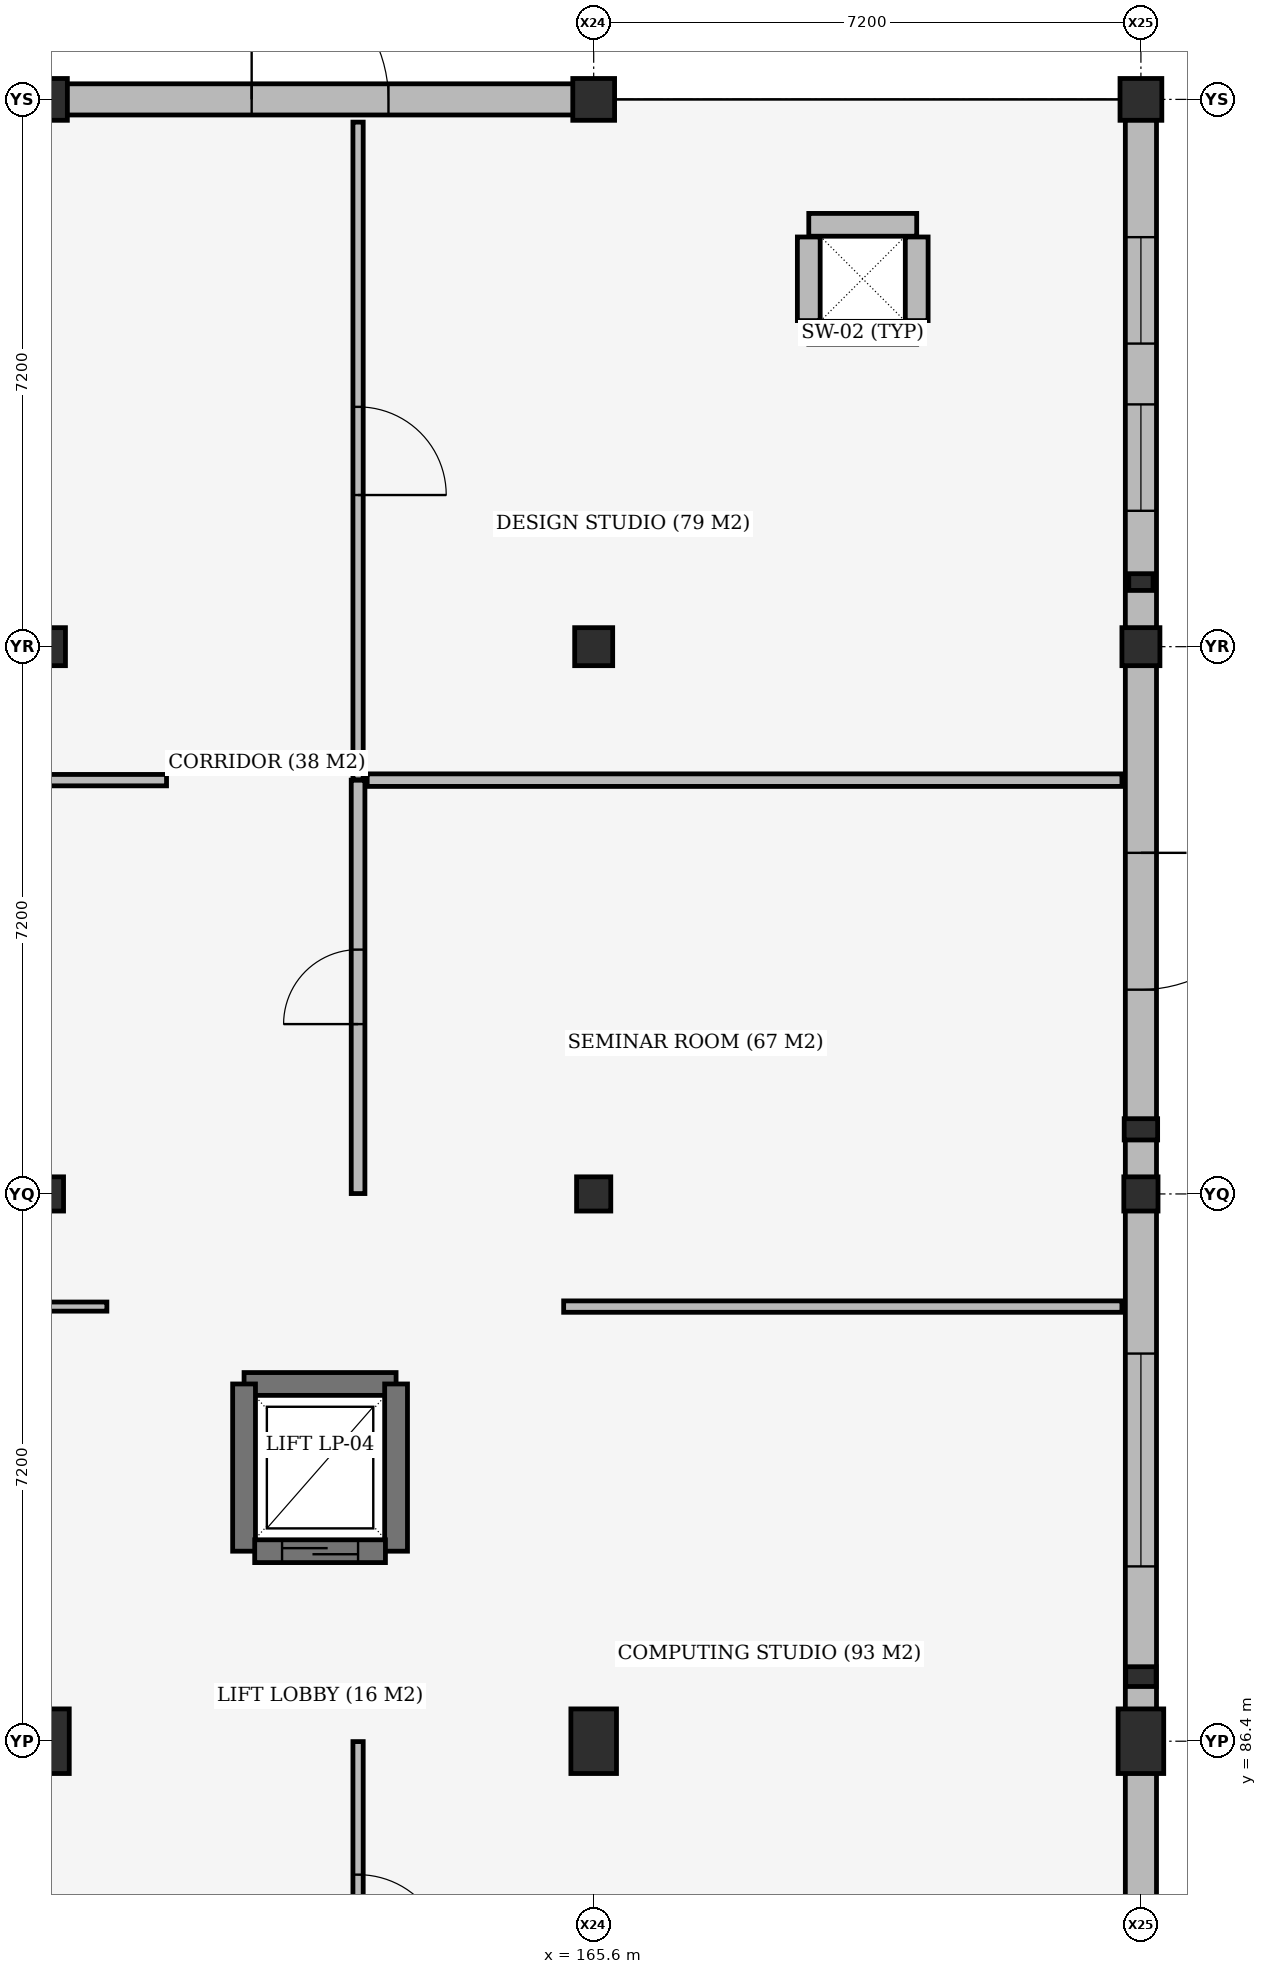
"""IFC4 building model, lengths in metres.
Left out: names, types, materials, properties, quantities, classifications, styles, units other than length and angle.
Written with IfcOpenShell. Run it as: python <this file> out.ifc"""

import sys

from ifc_helpers import new_model, si_unit, direction, frame, frame_2d, origin, origin_2d, place, context, subcontext, project, spatial, rectangle, extrude, element, fill, save


model = new_model("IFC4")
c1 = context("Model", 3, precision=1e-05, world=origin(), true_north=direction((0.0, 1.0)))
c2 = subcontext(c1, "Body", "Model", "MODEL_VIEW")
j1 = project(units=[si_unit("LENGTHUNIT", "METRE"), si_unit("PLANEANGLEUNIT", "RADIAN")], contexts=[c1])
p1 = place(None, origin())
s1 = spatial("IfcSite", under=j1, at=p1, CompositionType="ELEMENT")
p2 = place(p1, origin())
s2 = spatial("IfcBuilding", under=s1, at=p2, CompositionType="ELEMENT")
p3 = place(p2, origin())
s3 = spatial("IfcBuildingStorey", under=s2, at=p3, CompositionType="ELEMENT", Elevation=0.0)
p4 = place(p3, frame((168.43, 104.93, 0.0), z_axis=(0.0, 0.0, 1.0), x_axis=(1.0, 0.0, 0.0)))
e1 = element("IfcWall", 1, at=p4, inside=s3, PredefinedType="SHEAR", context=c2, shape_type="SweptSolid", body=[
    extrude(rectangle(XDim=1.42, YDim=0.3, at=frame_2d((0.71, 0.0))), origin(), (0.0, 0.0, 1.0), 5.16),
])
p5 = place(p3, frame((169.85, 105.09, 0.0), z_axis=(0.0, 0.0, 1.0), x_axis=(0.0, 1.0, 0.0)))
e2 = element("IfcWall", 2, at=p5, inside=s3, PredefinedType="SHEAR", context=c2, shape_type="SweptSolid", body=[
    extrude(rectangle(XDim=1.1, YDim=0.3, at=frame_2d((0.55, 0.0))), origin(), (0.0, 0.0, 1.0), 5.16),
])
p6 = place(p3, frame((169.85, 106.35, 0.0), z_axis=(0.0, 0.0, 1.0), x_axis=(-1.0, 0.0, 0.0)))
e3 = element("IfcWall", 3, at=p6, inside=s3, PredefinedType="SHEAR", context=c2, shape_type="SweptSolid", body=[
    extrude(rectangle(XDim=1.42, YDim=0.3, at=frame_2d((0.71, 0.0))), origin(), (0.0, 0.0, 1.0), 5.16),
])
p7 = place(p3, frame((168.43, 106.19, 0.0), z_axis=(0.0, 0.0, 1.0), x_axis=(0.0, -1.0, 0.0)))
e4 = element("IfcWall", 4, at=p7, inside=s3, PredefinedType="SHEAR", context=c2, shape_type="SweptSolid", body=[
    extrude(rectangle(XDim=1.1, YDim=0.3, at=frame_2d((0.55, 0.0))), origin(), (0.0, 0.0, 1.0), 5.16),
])
p8 = place(p3, frame((158.4, 86.4, 0.0), z_axis=(0.0, 0.0, 1.0), x_axis=(1.0, 0.0, 0.0)))
e5 = element("IfcColumn", 5, at=p8, inside=s3, PredefinedType="COLUMN", context=c2, shape_type="SweptSolid", body=[
    extrude(rectangle(XDim=0.6, YDim=0.85, at=origin_2d()), origin(), (0.0, 0.0, 1.0), 5.1),
])
p9 = place(p3, frame((158.4, 93.6, 0.0), z_axis=(0.0, 0.0, 1.0), x_axis=(1.0, 0.0, 0.0)))
e6 = element("IfcColumn", 6, at=p9, inside=s3, PredefinedType="COLUMN", context=c2, shape_type="SweptSolid", body=[
    extrude(rectangle(XDim=0.45, YDim=0.45, at=origin_2d()), origin(), (0.0, 0.0, 1.0), 5.1),
])
p10 = place(p3, frame((158.4, 100.8, 0.0), z_axis=(0.0, 0.0, 1.0), x_axis=(1.0, 0.0, 0.0)))
e7 = element("IfcColumn", 7, at=p10, inside=s3, PredefinedType="COLUMN", context=c2, shape_type="SweptSolid", body=[
    extrude(rectangle(XDim=0.5, YDim=0.5, at=origin_2d()), origin(), (0.0, 0.0, 1.0), 5.1),
])
p11 = place(p3, frame((158.4, 108.0, 0.0), z_axis=(0.0, 0.0, 1.0), x_axis=(1.0, 0.0, 0.0)))
e8 = element("IfcColumn", 8, at=p11, inside=s3, PredefinedType="COLUMN", context=c2, shape_type="SweptSolid", body=[
    extrude(rectangle(XDim=0.55, YDim=0.55, at=origin_2d()), origin(), (0.0, 0.0, 1.0), 5.1),
])
p12 = place(p3, frame((165.6, 86.4, 0.0), z_axis=(0.0, 0.0, 1.0), x_axis=(1.0, 0.0, 0.0)))
e9 = element("IfcColumn", 9, at=p12, inside=s3, PredefinedType="COLUMN", context=c2, shape_type="SweptSolid", body=[
    extrude(rectangle(XDim=0.6, YDim=0.85, at=origin_2d()), origin(), (0.0, 0.0, 1.0), 5.1),
])
p13 = place(p3, frame((165.6, 93.6, 0.0), z_axis=(0.0, 0.0, 1.0), x_axis=(1.0, 0.0, 0.0)))
e10 = element("IfcColumn", 10, at=p13, inside=s3, PredefinedType="COLUMN", context=c2, shape_type="SweptSolid", body=[
    extrude(rectangle(XDim=0.45, YDim=0.45, at=origin_2d()), origin(), (0.0, 0.0, 1.0), 5.1),
])
p14 = place(p3, frame((165.6, 100.8, 0.0), z_axis=(0.0, 0.0, 1.0), x_axis=(1.0, 0.0, 0.0)))
e11 = element("IfcColumn", 11, at=p14, inside=s3, PredefinedType="COLUMN", context=c2, shape_type="SweptSolid", body=[
    extrude(rectangle(XDim=0.5, YDim=0.5, at=origin_2d()), origin(), (0.0, 0.0, 1.0), 5.1),
])
p15 = place(p3, frame((165.6, 108.0, 0.0), z_axis=(0.0, 0.0, 1.0), x_axis=(1.0, 0.0, 0.0)))
e12 = element("IfcColumn", 12, at=p15, inside=s3, PredefinedType="COLUMN", context=c2, shape_type="SweptSolid", body=[
    extrude(rectangle(XDim=0.55, YDim=0.55, at=origin_2d()), origin(), (0.0, 0.0, 1.0), 5.1),
])
p16 = place(p3, frame((172.8, 86.4, 0.0), z_axis=(0.0, 0.0, 1.0), x_axis=(1.0, 0.0, 0.0)))
e13 = element("IfcColumn", 13, at=p16, inside=s3, PredefinedType="COLUMN", context=c2, shape_type="SweptSolid", body=[
    extrude(rectangle(XDim=0.6, YDim=0.85, at=origin_2d()), origin(), (0.0, 0.0, 1.0), 5.1),
])
p17 = place(p3, frame((172.8, 93.6, 0.0), z_axis=(0.0, 0.0, 1.0), x_axis=(1.0, 0.0, 0.0)))
e14 = element("IfcColumn", 14, at=p17, inside=s3, PredefinedType="COLUMN", context=c2, shape_type="SweptSolid", body=[
    extrude(rectangle(XDim=0.45, YDim=0.45, at=origin_2d()), origin(), (0.0, 0.0, 1.0), 5.1),
])
p18 = place(p3, frame((172.8, 100.8, 0.0), z_axis=(0.0, 0.0, 1.0), x_axis=(1.0, 0.0, 0.0)))
e15 = element("IfcColumn", 15, at=p18, inside=s3, PredefinedType="COLUMN", context=c2, shape_type="SweptSolid", body=[
    extrude(rectangle(XDim=0.5, YDim=0.5, at=origin_2d()), origin(), (0.0, 0.0, 1.0), 5.1),
])
p19 = place(p3, frame((172.8, 108.0, 0.0), z_axis=(0.0, 0.0, 1.0), x_axis=(1.0, 0.0, 0.0)))
e16 = element("IfcColumn", 16, at=p19, inside=s3, PredefinedType="COLUMN", context=c2, shape_type="SweptSolid", body=[
    extrude(rectangle(XDim=0.55, YDim=0.55, at=origin_2d()), origin(), (0.0, 0.0, 1.0), 5.1),
])
p20 = place(p3, frame((172.8, 87.25, 0.0), z_axis=(0.0, 0.0, 1.0), x_axis=(1.0, 0.0, 0.0)))
e17 = element("IfcColumn", 17, at=p20, inside=s3, PredefinedType="PILASTER", context=c2, shape_type="SweptSolid", body=[
    extrude(rectangle(XDim=0.4, YDim=0.26, at=origin_2d()), origin(), (0.0, 0.0, 1.0), 5.1),
])
p21 = place(p3, frame((172.8, 94.45, 0.0), z_axis=(0.0, 0.0, 1.0), x_axis=(1.0, 0.0, 0.0)))
e18 = element("IfcColumn", 18, at=p21, inside=s3, PredefinedType="PILASTER", context=c2, shape_type="SweptSolid", body=[
    extrude(rectangle(XDim=0.44, YDim=0.28, at=origin_2d()), origin(), (0.0, 0.0, 1.0), 5.1),
])
p22 = place(p3, frame((172.8, 101.65, 0.0), z_axis=(0.0, 0.0, 1.0), x_axis=(1.0, 0.0, 0.0)))
e19 = element("IfcColumn", 19, at=p22, inside=s3, PredefinedType="PILASTER", context=c2, shape_type="SweptSolid", body=[
    extrude(rectangle(XDim=0.32, YDim=0.22, at=origin_2d()), origin(), (0.0, 0.0, 1.0), 5.1),
])
p23 = place(p3, frame((163.0, 91.1, 0.0), z_axis=(0.0, 0.0, 1.0), x_axis=(-1.0, 0.0, 0.0)))
e20 = element("IfcWall", 20, at=p23, inside=s3, PredefinedType="SHEAR", context=c2, shape_type="SweptSolid", body=[
    extrude(rectangle(XDim=2.0, YDim=0.3, at=frame_2d((1.0, 0.0))), origin(), (0.0, 0.0, 1.0), 5.1),
])
for number, where, z_axis, x_axis in (
    (21, (161.0, 91.1, 0.0), (0.0, 0.0, 1.0), (0.0, -1.0, 0.0)),
    (22, (163.0, 88.9, 0.0), (0.0, 0.0, 1.0), (0.0, 1.0, 0.0)),
):
    element("IfcWall", number, at=place(p3, frame(where, z_axis=z_axis, x_axis=x_axis)), inside=s3, PredefinedType="SHEAR", context=c2, shape_type="SweptSolid", body=[
        extrude(rectangle(XDim=2.2, YDim=0.3, at=frame_2d((1.1, 0.0))), origin(), (0.0, 0.0, 1.0), 5.1),
    ])
p24 = place(p3, frame((158.667, 108.0, 0.0), z_axis=(0.0, 0.0, 1.0), x_axis=(1.0, 0.0, 0.0)))
e23 = element("IfcWall", 23, at=p24, inside=s3, PredefinedType="STANDARD", context=c2, shape_type="SweptSolid", body=[
    extrude(rectangle(XDim=6.666, YDim=0.41, at=frame_2d((3.333, 0.0))), origin(), (0.0, 0.0, 1.0), 4.5),
])
p25 = place(p24, frame((2.433, 0.0, 0.0)))
e24 = element("IfcOpeningElement", 24, at=p25, cuts=e23, PredefinedType="OPENING", context=c2, shape_type="SweptSolid", body=[
    extrude(rectangle(XDim=1.8, YDim=2.2, at=frame_2d((0.9, 1.1))), frame((0.0, 0.215, 0.0), z_axis=(0.0, -1.0, 0.0), x_axis=(1.0, 0.0, 0.0)), (0.0, 0.0, 1.0), 0.43),
])
p26 = place(p3, frame((172.8, 85.983, 0.0), z_axis=(0.0, 0.0, 1.0), x_axis=(0.0, -1.0, 0.0)))
e25 = element("IfcWall", 25, at=p26, inside=s3, PredefinedType="STANDARD", context=c2, shape_type="SweptSolid", body=[
    extrude(rectangle(XDim=2.841, YDim=0.41, at=frame_2d((1.42, 0.0))), origin(), (0.0, 0.0, 1.0), 4.5),
])
p27 = place(p3, frame((172.8, 93.383, 0.0), z_axis=(0.0, 0.0, 1.0), x_axis=(0.0, -1.0, 0.0)))
e26 = element("IfcWall", 26, at=p27, inside=s3, PredefinedType="STANDARD", context=c2, shape_type="SweptSolid", body=[
    extrude(rectangle(XDim=6.566, YDim=0.41, at=frame_2d((3.283, 0.0))), origin(), (0.0, 0.0, 1.0), 4.4),
])
p28 = place(p27, frame((1.883, 0.0, 0.85)))
e27 = element("IfcOpeningElement", 27, at=p28, cuts=e26, PredefinedType="OPENING", context=c2, shape_type="SweptSolid", body=[
    extrude(rectangle(XDim=2.8, YDim=2.4, at=frame_2d((1.4, 1.2))), frame((0.0, 0.215, 0.0), z_axis=(0.0, -1.0, 0.0), x_axis=(1.0, 0.0, 0.0)), (0.0, 0.0, 1.0), 0.43),
])
p29 = place(p3, frame((172.8, 100.558, 0.0), z_axis=(0.0, 0.0, 1.0), x_axis=(0.0, -1.0, 0.0)))
e28 = element("IfcWall", 28, at=p29, inside=s3, PredefinedType="STANDARD", context=c2, shape_type="SweptSolid", body=[
    extrude(rectangle(XDim=6.741, YDim=0.41, at=frame_2d((3.371, 0.0))), origin(), (0.0, 0.0, 1.0), 4.3),
])
p30 = place(p29, frame((2.47, 0.0, 0.0)))
e29 = element("IfcOpeningElement", 29, at=p30, cuts=e28, PredefinedType="OPENING", context=c2, shape_type="SweptSolid", body=[
    extrude(rectangle(XDim=1.8, YDim=2.2, at=frame_2d((0.9, 1.1))), frame((0.0, 0.215, 0.0), z_axis=(0.0, -1.0, 0.0), x_axis=(1.0, 0.0, 0.0)), (0.0, 0.0, 1.0), 0.43),
])
p31 = place(p3, frame((172.8, 107.733, 0.0), z_axis=(0.0, 0.0, 1.0), x_axis=(0.0, -1.0, 0.0)))
e30 = element("IfcWall", 30, at=p31, inside=s3, PredefinedType="STANDARD", context=c2, shape_type="SweptSolid", body=[
    extrude(rectangle(XDim=6.691, YDim=0.41, at=frame_2d((3.345, 0.0))), origin(), (0.0, 0.0, 1.0), 4.3),
])
p32 = place(p31, frame((1.545, 0.0, 0.85)))
e31 = element("IfcOpeningElement", 31, at=p32, cuts=e30, PredefinedType="OPENING", context=c2, shape_type="SweptSolid", body=[
    extrude(rectangle(XDim=1.4, YDim=2.6, at=frame_2d((0.7, 1.3))), frame((0.0, 0.215, 0.0), z_axis=(0.0, -1.0, 0.0), x_axis=(1.0, 0.0, 0.0)), (0.0, 0.0, 1.0), 0.43),
])
p33 = place(p31, frame((3.746, 0.0, 0.85)))
e32 = element("IfcOpeningElement", 32, at=p33, cuts=e30, PredefinedType="OPENING", context=c2, shape_type="SweptSolid", body=[
    extrude(rectangle(XDim=1.4, YDim=2.6, at=frame_2d((0.7, 1.3))), frame((0.0, 0.215, 0.0), z_axis=(0.0, -1.0, 0.0), x_axis=(1.0, 0.0, 0.0)), (0.0, 0.0, 1.0), 0.43),
])
p34 = place(p3, frame((162.86, 88.9, 0.0), z_axis=(0.0, 0.0, 1.0), x_axis=(-1.0, 0.0, 0.0)))
e33 = element("IfcWall", 33, at=p34, inside=s3, PredefinedType="SHEAR", context=c2, shape_type="SweptSolid", body=[
    extrude(rectangle(XDim=1.72, YDim=0.3, at=frame_2d((0.86, 0.0))), origin(), (0.0, 0.0, 1.0), 5.1),
])
p35 = place(p34, frame((0.36, 0.0, 0.0)))
e34 = element("IfcOpeningElement", 34, at=p35, cuts=e33, PredefinedType="OPENING", context=c2, shape_type="SweptSolid", body=[
    extrude(rectangle(XDim=1.0, YDim=2.1, at=frame_2d((0.5, 1.05))), frame((0.0, 0.16, 0.0), z_axis=(0.0, -1.0, 0.0), x_axis=(1.0, 0.0, 0.0)), (0.0, 0.0, 1.0), 0.32),
])
p36 = place(p3, frame((137.205, 92.118, 0.0), z_axis=(0.0, 0.0, 1.0), x_axis=(1.0, 0.0, 0.0)))
e35 = element("IfcWall", 35, at=p36, inside=s3, PredefinedType="PARTITIONING", context=c2, shape_type="SweptSolid", body=[
    extrude(rectangle(XDim=21.99, YDim=0.12, at=frame_2d((10.995, 0.0))), origin(), (0.0, 0.0, 1.0), 4.3),
])
p37 = place(p3, frame((133.87, 99.044, 0.0), z_axis=(0.0, 0.0, 1.0), x_axis=(1.0, 0.0, 0.0)))
e36 = element("IfcWall", 36, at=p37, inside=s3, PredefinedType="PARTITIONING", context=c2, shape_type="SweptSolid", body=[
    extrude(rectangle(XDim=26.11, YDim=0.15, at=frame_2d((13.055, 0.0))), origin(), (0.0, 0.0, 1.0), 4.45),
])
p38 = place(p3, frame((162.5, 81.734, 0.0), z_axis=(0.0, 0.0, 1.0), x_axis=(0.0, 1.0, 0.0)))
e37 = element("IfcWall", 37, at=p38, inside=s3, PredefinedType="PARTITIONING", context=c2, shape_type="SweptSolid", body=[
    extrude(rectangle(XDim=4.661, YDim=0.135, at=frame_2d((2.331, 0.0))), origin(), (0.0, 0.0, 1.0), 4.3),
])
p39 = place(p38, frame((1.75, 0.0, 0.0)))
e38 = element("IfcOpeningElement", 38, at=p39, cuts=e37, PredefinedType="OPENING", context=c2, shape_type="SweptSolid", body=[
    extrude(rectangle(XDim=1.16, YDim=2.2, at=frame_2d((0.58, 1.1))), frame((0.0, 0.077, 0.0), z_axis=(0.0, -1.0, 0.0), x_axis=(1.0, 0.0, 0.0)), (0.0, 0.0, 1.0), 0.155),
])
p40 = place(p3, frame((165.205, 92.118, 0.0), z_axis=(0.0, 0.0, 1.0), x_axis=(1.0, 0.0, 0.0)))
e39 = element("IfcWall", 39, at=p40, inside=s3, PredefinedType="PARTITIONING", context=c2, shape_type="SweptSolid", body=[
    extrude(rectangle(XDim=7.345, YDim=0.15, at=frame_2d((3.672, 0.0))), origin(), (0.0, 0.0, 1.0), 4.4),
])
p41 = place(p3, frame((162.5, 93.605, 0.0), z_axis=(0.0, 0.0, 1.0), x_axis=(0.0, 1.0, 0.0)))
e40 = element("IfcWall", 40, at=p41, inside=s3, PredefinedType="PARTITIONING", context=c2, shape_type="SweptSolid", body=[
    extrude(rectangle(XDim=5.439, YDim=0.18, at=frame_2d((2.719, 0.0))), origin(), (0.0, 0.0, 1.0), 4.45),
])
p42 = place(p41, frame((2.229, 0.0, 0.0)))
e41 = element("IfcOpeningElement", 41, at=p42, cuts=e40, PredefinedType="OPENING", context=c2, shape_type="SweptSolid", body=[
    extrude(rectangle(XDim=0.98, YDim=2.18, at=frame_2d((0.49, 1.09))), frame((0.0, 0.1, 0.0), z_axis=(0.0, -1.0, 0.0), x_axis=(1.0, 0.0, 0.0)), (0.0, 0.0, 1.0), 0.2),
])
p43 = place(p3, frame((162.62, 99.044, 0.0), z_axis=(0.0, 0.0, 1.0), x_axis=(1.0, 0.0, 0.0)))
e42 = element("IfcWall", 42, at=p43, inside=s3, PredefinedType="PARTITIONING", context=c2, shape_type="SweptSolid", body=[
    extrude(rectangle(XDim=9.93, YDim=0.165, at=frame_2d((4.965, 0.0))), origin(), (0.0, 0.0, 1.0), 4.35),
])
p44 = place(p3, frame((162.5, 99.049, 0.0), z_axis=(0.0, 0.0, 1.0), x_axis=(0.0, 1.0, 0.0)))
e43 = element("IfcWall", 43, at=p44, inside=s3, PredefinedType="PARTITIONING", context=c2, shape_type="SweptSolid", body=[
    extrude(rectangle(XDim=8.652, YDim=0.135, at=frame_2d((4.326, 0.0))), origin(), (0.0, 0.0, 1.0), 4.35),
])
p45 = place(p44, frame((3.746, 0.0, 0.0)))
e44 = element("IfcOpeningElement", 44, at=p45, cuts=e43, PredefinedType="OPENING", context=c2, shape_type="SweptSolid", body=[
    extrude(rectangle(XDim=1.16, YDim=2.2, at=frame_2d((0.58, 1.1))), frame((0.0, 0.077, 0.0), z_axis=(0.0, -1.0, 0.0), x_axis=(1.0, 0.0, 0.0)), (0.0, 0.0, 1.0), 0.155),
])
p46 = place(p25, origin())
e45 = element("IfcDoor", 45, at=p46, inside=s3, OperationType="DOUBLE_DOOR_SINGLE_SWING", PredefinedType="DOOR", context=c2, shape_type="SweptSolid", body=[
    extrude(rectangle(XDim=1.8, YDim=2.2, at=frame_2d((0.9, 1.1))), frame((0.0, 0.025, 0.0), z_axis=(0.0, -1.0, 0.0), x_axis=(1.0, 0.0, 0.0)), (0.0, 0.0, 1.0), 0.05),
])
fill(e24, e45)
p47 = place(p28, origin())
e46 = element("IfcWindow", 46, at=p47, inside=s3, PartitioningType="DOUBLE_PANEL_VERTICAL", PredefinedType="WINDOW", context=c2, shape_type="SweptSolid", body=[
    extrude(rectangle(XDim=2.8, YDim=2.4, at=frame_2d((1.4, 1.2))), frame((0.0, 0.03, 0.0), z_axis=(0.0, -1.0, 0.0), x_axis=(1.0, 0.0, 0.0)), (0.0, 0.0, 1.0), 0.06),
])
fill(e27, e46)
p48 = place(p30, origin())
e47 = element("IfcDoor", 47, at=p48, inside=s3, OperationType="DOUBLE_DOOR_SINGLE_SWING", PredefinedType="DOOR", context=c2, shape_type="SweptSolid", body=[
    extrude(rectangle(XDim=1.8, YDim=2.2, at=frame_2d((0.9, 1.1))), frame((0.0, 0.025, 0.0), z_axis=(0.0, -1.0, 0.0), x_axis=(1.0, 0.0, 0.0)), (0.0, 0.0, 1.0), 0.05),
])
fill(e29, e47)
p49 = place(p32, origin())
e48 = element("IfcWindow", 48, at=p49, inside=s3, PartitioningType="DOUBLE_PANEL_VERTICAL", PredefinedType="WINDOW", context=c2, shape_type="SweptSolid", body=[
    extrude(rectangle(XDim=1.4, YDim=2.6, at=frame_2d((0.7, 1.3))), frame((0.0, 0.03, 0.0), z_axis=(0.0, -1.0, 0.0), x_axis=(1.0, 0.0, 0.0)), (0.0, 0.0, 1.0), 0.06),
])
fill(e31, e48)
p50 = place(p33, origin())
e49 = element("IfcWindow", 49, at=p50, inside=s3, PartitioningType="DOUBLE_PANEL_VERTICAL", PredefinedType="WINDOW", context=c2, shape_type="SweptSolid", body=[
    extrude(rectangle(XDim=1.4, YDim=2.6, at=frame_2d((0.7, 1.3))), frame((0.0, 0.03, 0.0), z_axis=(0.0, -1.0, 0.0), x_axis=(1.0, 0.0, 0.0)), (0.0, 0.0, 1.0), 0.06),
])
fill(e32, e49)
p51 = place(p35, origin())
e50 = element("IfcDoor", 50, at=p51, inside=s3, OperationType="SLIDING_TO_LEFT", PredefinedType="DOOR", context=c2, shape_type="SweptSolid", body=[
    extrude(rectangle(XDim=1.0, YDim=2.1, at=frame_2d((0.5, 1.05))), frame((0.0, 0.025, 0.0), z_axis=(0.0, -1.0, 0.0), x_axis=(1.0, 0.0, 0.0)), (0.0, 0.0, 1.0), 0.05),
])
fill(e34, e50)
p52 = place(p39, origin())
e51 = element("IfcDoor", 51, at=p52, inside=s3, OperationType="SINGLE_SWING_RIGHT", PredefinedType="DOOR", context=c2, shape_type="SweptSolid", body=[
    extrude(rectangle(XDim=1.16, YDim=2.2, at=frame_2d((0.58, 1.1))), frame((0.0, 0.025, 0.0), z_axis=(0.0, -1.0, 0.0), x_axis=(1.0, 0.0, 0.0)), (0.0, 0.0, 1.0), 0.05),
])
fill(e38, e51)
p53 = place(p42, origin())
e52 = element("IfcDoor", 52, at=p53, inside=s3, OperationType="SINGLE_SWING_LEFT", PredefinedType="DOOR", context=c2, shape_type="SweptSolid", body=[
    extrude(rectangle(XDim=0.98, YDim=2.18, at=frame_2d((0.49, 1.09))), frame((0.0, 0.025, 0.0), z_axis=(0.0, -1.0, 0.0), x_axis=(1.0, 0.0, 0.0)), (0.0, 0.0, 1.0), 0.05),
])
fill(e41, e52)
p54 = place(p45, origin())
e53 = element("IfcDoor", 53, at=p54, inside=s3, OperationType="SINGLE_SWING_RIGHT", PredefinedType="DOOR", context=c2, shape_type="SweptSolid", body=[
    extrude(rectangle(XDim=1.16, YDim=2.2, at=frame_2d((0.58, 1.1))), frame((0.0, 0.025, 0.0), z_axis=(0.0, -1.0, 0.0), x_axis=(1.0, 0.0, 0.0)), (0.0, 0.0, 1.0), 0.05),
])
fill(e44, e53)
save(model, sys.argv[1])
